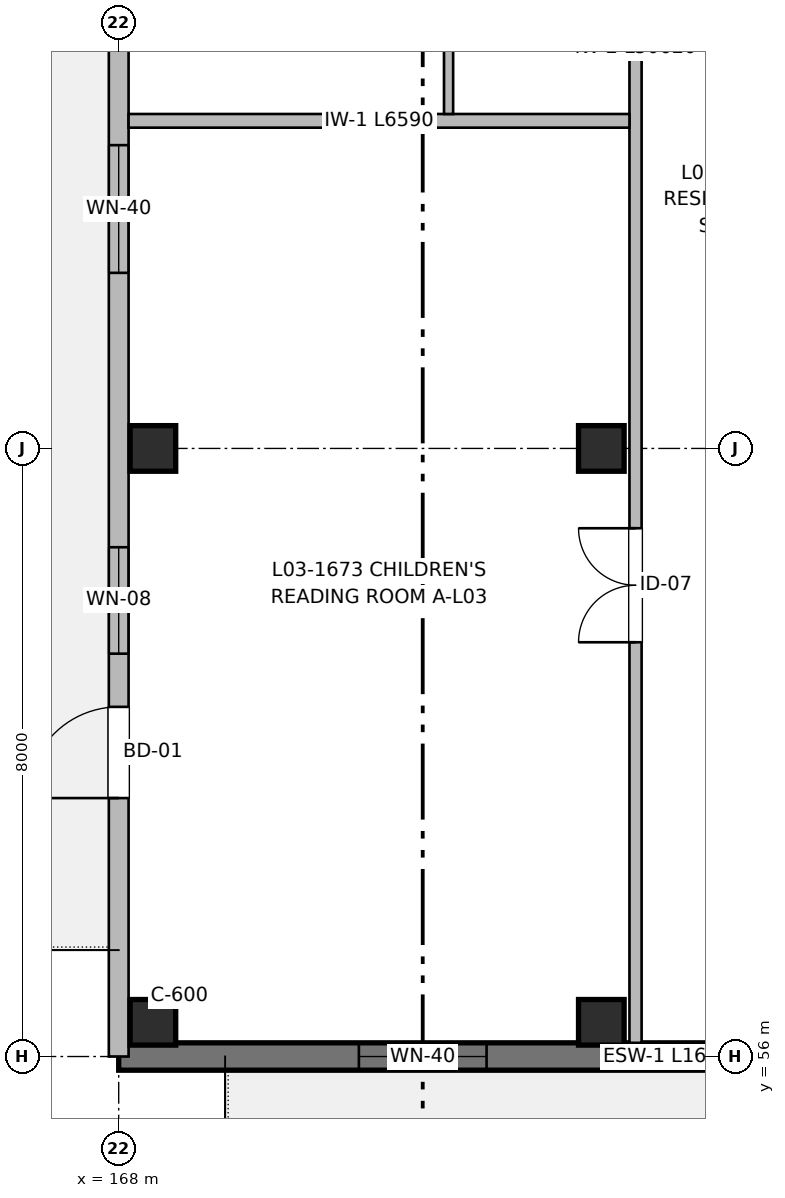
"""IFC4 building model, lengths in metres.
Left out: names, types, materials, properties, quantities, classifications, styles, units other than length and angle.
Written with IfcOpenShell. Run it as: python <this file> out.ifc"""

import sys

from ifc_helpers import new_model, si_unit, direction, frame, frame_2d, origin, origin_2d, place, context, subcontext, project, spatial, rectangle, extrude, element, fill, save


model = new_model("IFC4")
c1 = context("Model", 3, precision=1e-05, world=origin(), true_north=direction((0.0, 1.0)))
c2 = subcontext(c1, "Body", "Model", "MODEL_VIEW")
j1 = project(units=[si_unit("LENGTHUNIT", "METRE"), si_unit("PLANEANGLEUNIT", "RADIAN")], contexts=[c1])
p1 = place(None, origin())
s1 = spatial("IfcSite", under=j1, at=p1, CompositionType="ELEMENT")
p2 = place(p1, origin())
s2 = spatial("IfcBuilding", under=s1, at=p2, CompositionType="ELEMENT")
p3 = place(p2, frame((0.0, 0.0, 10.56)))
s3 = spatial("IfcBuildingStorey", under=s2, at=p3, CompositionType="ELEMENT", Elevation=10.56)
for number, where, z_axis, x_axis in (
    (1, (168.45, 56.45, 0.0), (0.0, 0.0, 1.0), (1.0, 0.0, 0.0)),
    (2, (168.45, 64.0, 0.0), (0.0, 0.0, 1.0), (1.0, 0.0, 0.0)),
    (3, (174.35, 56.45, 0.0), (0.0, 0.0, 1.0), (1.0, 0.0, 0.0)),
    (4, (174.35, 64.0, 0.0), (0.0, 0.0, 1.0), (1.0, 0.0, 0.0)),
):
    element("IfcColumn", number, at=place(p3, frame(where, z_axis=z_axis, x_axis=x_axis)), inside=s3, PredefinedType="COLUMN", context=c2, shape_type="SweptSolid", body=[
        extrude(rectangle(XDim=0.6, YDim=0.6, at=origin_2d()), origin(), (0.0, 0.0, 1.0), 3.2),
    ])
p4 = place(p3, frame((184.0, 56.0, 0.0), z_axis=(0.0, 0.0, 1.0), x_axis=(-1.0, 0.0, 0.0)))
e5 = element("IfcWall", 5, at=p4, inside=s3, PredefinedType="SHEAR", context=c2, shape_type="SweptSolid", body=[
    extrude(rectangle(XDim=16.0, YDim=0.36, at=frame_2d((8.0, 0.0))), origin(), (0.0, 0.0, 1.0), 2.98),
])
p5 = place(p4, frame((3.4, 0.0, 0.0)))
e6 = element("IfcOpeningElement", 6, at=p5, cuts=e5, PredefinedType="OPENING", context=c2, shape_type="SweptSolid", body=[
    extrude(rectangle(XDim=1.2, YDim=2.2, at=frame_2d((0.6, 1.1))), frame((0.0, 0.19, 0.0), z_axis=(0.0, -1.0, 0.0), x_axis=(1.0, 0.0, 0.0)), (0.0, 0.0, 1.0), 0.38),
])
p6 = place(p4, frame((4.85, 0.0, 0.87)))
e7 = element("IfcOpeningElement", 7, at=p6, cuts=e5, PredefinedType="OPENING", context=c2, shape_type="SweptSolid", body=[
    extrude(rectangle(XDim=1.4, YDim=1.35, at=frame_2d((0.7, 0.675))), frame((0.0, 0.19, 0.0), z_axis=(0.0, -1.0, 0.0), x_axis=(1.0, 0.0, 0.0)), (0.0, 0.0, 1.0), 0.38),
])
p7 = place(p4, frame((11.16, 0.0, 0.72)))
e8 = element("IfcOpeningElement", 8, at=p7, cuts=e5, PredefinedType="OPENING", context=c2, shape_type="SweptSolid", body=[
    extrude(rectangle(XDim=1.68, YDim=1.5, at=frame_2d((0.84, 0.75))), frame((0.0, 0.19, 0.0), z_axis=(0.0, -1.0, 0.0), x_axis=(1.0, 0.0, 0.0)), (0.0, 0.0, 1.0), 0.38),
])
p8 = place(p3, frame((168.0, 56.0, 0.0), z_axis=(0.0, 0.0, 1.0), x_axis=(0.0, 1.0, 0.0)))
e9 = element("IfcWall", 9, at=p8, inside=s3, PredefinedType="SOLIDWALL", context=c2, shape_type="SweptSolid", body=[
    extrude(rectangle(XDim=32.0, YDim=0.26, at=frame_2d((16.0, 0.0))), origin(), (0.0, 0.0, 1.0), 2.98),
])
p9 = place(p8, frame((3.4, 0.0, 0.0)))
e10 = element("IfcOpeningElement", 10, at=p9, cuts=e9, PredefinedType="OPENING", context=c2, shape_type="SweptSolid", body=[
    extrude(rectangle(XDim=1.2, YDim=2.2, at=frame_2d((0.6, 1.1))), frame((0.0, 0.14, 0.0), z_axis=(0.0, -1.0, 0.0), x_axis=(1.0, 0.0, 0.0)), (0.0, 0.0, 1.0), 0.28),
])
p10 = place(p8, frame((5.3, 0.0, 0.87)))
e11 = element("IfcOpeningElement", 11, at=p10, cuts=e9, PredefinedType="OPENING", context=c2, shape_type="SweptSolid", body=[
    extrude(rectangle(XDim=1.4, YDim=1.35, at=frame_2d((0.7, 0.675))), frame((0.0, 0.14, 0.0), z_axis=(0.0, -1.0, 0.0), x_axis=(1.0, 0.0, 0.0)), (0.0, 0.0, 1.0), 0.28),
])
p11 = place(p8, frame((10.31, 0.0, 0.72)))
e12 = element("IfcOpeningElement", 12, at=p11, cuts=e9, PredefinedType="OPENING", context=c2, shape_type="SweptSolid", body=[
    extrude(rectangle(XDim=1.68, YDim=1.5, at=frame_2d((0.84, 0.75))), frame((0.0, 0.14, 0.0), z_axis=(0.0, -1.0, 0.0), x_axis=(1.0, 0.0, 0.0)), (0.0, 0.0, 1.0), 0.28),
])
p12 = place(p8, frame((19.1, 0.0, 0.72)))
e13 = element("IfcOpeningElement", 13, at=p12, cuts=e9, PredefinedType="OPENING", context=c2, shape_type="SweptSolid", body=[
    extrude(rectangle(XDim=1.8, YDim=1.5, at=frame_2d((0.9, 0.75))), frame((0.0, 0.14, 0.0), z_axis=(0.0, -1.0, 0.0), x_axis=(1.0, 0.0, 0.0)), (0.0, 0.0, 1.0), 0.28),
])
p13 = place(p8, frame((27.0, 0.0, 0.72)))
e14 = element("IfcOpeningElement", 14, at=p13, cuts=e9, PredefinedType="OPENING", context=c2, shape_type="SweptSolid", body=[
    extrude(rectangle(XDim=2.0, YDim=1.5, at=frame_2d((1.0, 0.75))), frame((0.0, 0.14, 0.0), z_axis=(0.0, -1.0, 0.0), x_axis=(1.0, 0.0, 0.0)), (0.0, 0.0, 1.0), 0.28),
])
p14 = place(p8, frame((13.79, 0.0, 0.82)))
e15 = element("IfcOpeningElement", 15, at=p14, cuts=e9, PredefinedType="OPENING", context=c2, shape_type="SweptSolid", body=[
    extrude(rectangle(XDim=1.5, YDim=1.4, at=frame_2d((0.75, 0.7))), frame((0.0, 0.14, 0.0), z_axis=(0.0, -1.0, 0.0), x_axis=(1.0, 0.0, 0.0)), (0.0, 0.0, 1.0), 0.28),
])
p15 = place(p8, frame((24.43, 0.0, 0.82)))
e16 = element("IfcOpeningElement", 16, at=p15, cuts=e9, PredefinedType="OPENING", context=c2, shape_type="SweptSolid", body=[
    extrude(rectangle(XDim=1.5, YDim=1.4, at=frame_2d((0.75, 0.7))), frame((0.0, 0.14, 0.0), z_axis=(0.0, -1.0, 0.0), x_axis=(1.0, 0.0, 0.0)), (0.0, 0.0, 1.0), 0.28),
])
p16 = place(p8, frame((30.895, 0.0, 0.9)))
e17 = element("IfcOpeningElement", 17, at=p16, cuts=e9, PredefinedType="OPENING", context=c2, shape_type="SweptSolid", body=[
    extrude(rectangle(XDim=0.65, YDim=0.95, at=frame_2d((0.325, 0.475))), frame((0.0, 0.14, 0.0), z_axis=(0.0, -1.0, 0.0), x_axis=(1.0, 0.0, 0.0)), (0.0, 0.0, 1.0), 0.28),
])
p17 = place(p3, frame((174.8, 56.18, 0.0), z_axis=(0.0, 0.0, 1.0), x_axis=(0.0, 1.0, 0.0)))
e18 = element("IfcWall", 18, at=p17, inside=s3, PredefinedType="PARTITIONING", context=c2, shape_type="SweptSolid", body=[
    extrude(rectangle(XDim=50.62, YDim=0.16, at=frame_2d((25.31, 0.0))), origin(), (0.0, 0.0, 1.0), 2.935),
])
p18 = place(p17, frame((5.27, 0.0, 0.0)))
e19 = element("IfcOpeningElement", 19, at=p18, cuts=e18, PredefinedType="OPENING", context=c2, shape_type="SweptSolid", body=[
    extrude(rectangle(XDim=1.5, YDim=2.2, at=frame_2d((0.75, 1.1))), frame((0.0, 0.09, 0.0), z_axis=(0.0, -1.0, 0.0), x_axis=(1.0, 0.0, 0.0)), (0.0, 0.0, 1.0), 0.18),
])
p19 = place(p17, frame((19.4, 0.0, 0.0)))
e20 = element("IfcOpeningElement", 20, at=p19, cuts=e18, PredefinedType="OPENING", context=c2, shape_type="SweptSolid", body=[
    extrude(rectangle(XDim=1.02, YDim=2.15, at=frame_2d((0.51, 1.075))), frame((0.0, 0.09, 0.0), z_axis=(0.0, -1.0, 0.0), x_axis=(1.0, 0.0, 0.0)), (0.0, 0.0, 1.0), 0.18),
])
p20 = place(p17, frame((33.08, 0.0, 0.0)))
e21 = element("IfcOpeningElement", 21, at=p20, cuts=e18, PredefinedType="OPENING", context=c2, shape_type="SweptSolid", body=[
    extrude(rectangle(XDim=0.98, YDim=2.15, at=frame_2d((0.49, 1.075))), frame((0.0, 0.09, 0.0), z_axis=(0.0, -1.0, 0.0), x_axis=(1.0, 0.0, 0.0)), (0.0, 0.0, 1.0), 0.18),
])
p21 = place(p17, frame((45.33, 0.0, 0.0)))
e22 = element("IfcOpeningElement", 22, at=p21, cuts=e18, PredefinedType="OPENING", context=c2, shape_type="SweptSolid", body=[
    extrude(rectangle(XDim=0.98, YDim=2.15, at=frame_2d((0.49, 1.075))), frame((0.0, 0.09, 0.0), z_axis=(0.0, -1.0, 0.0), x_axis=(1.0, 0.0, 0.0)), (0.0, 0.0, 1.0), 0.18),
])
p22 = place(p3, frame((168.13, 68.31, 0.0), z_axis=(0.0, 0.0, 1.0), x_axis=(1.0, 0.0, 0.0)))
e23 = element("IfcWall", 23, at=p22, inside=s3, PredefinedType="PARTITIONING", context=c2, shape_type="SweptSolid", body=[
    extrude(rectangle(XDim=6.59, YDim=0.18, at=frame_2d((3.295, 0.0))), origin(), (0.0, 0.0, 1.0), 2.935),
])
p23 = place(p3, frame((172.34, 68.4, 0.0), z_axis=(0.0, 0.0, 1.0), x_axis=(0.0, 1.0, 0.0)))
e24 = element("IfcWall", 24, at=p23, inside=s3, PredefinedType="PARTITIONING", context=c2, shape_type="SweptSolid", body=[
    extrude(rectangle(XDim=13.97, YDim=0.12, at=frame_2d((6.985, 0.0))), origin(), (0.0, 0.0, 1.0), 2.935),
])
p24 = place(p23, frame((2.443, 0.0, 0.0)))
e25 = element("IfcOpeningElement", 25, at=p24, cuts=e24, PredefinedType="OPENING", context=c2, shape_type="SweptSolid", body=[
    extrude(rectangle(XDim=0.94, YDim=2.1, at=frame_2d((0.47, 1.05))), frame((0.0, 0.07, 0.0), z_axis=(0.0, -1.0, 0.0), x_axis=(1.0, 0.0, 0.0)), (0.0, 0.0, 1.0), 0.14),
])
p25 = place(p23, frame((8.541, 0.0, 0.0)))
e26 = element("IfcOpeningElement", 26, at=p25, cuts=e24, PredefinedType="OPENING", context=c2, shape_type="SweptSolid", body=[
    extrude(rectangle(XDim=0.92, YDim=2.1, at=frame_2d((0.46, 1.05))), frame((0.0, 0.07, 0.0), z_axis=(0.0, -1.0, 0.0), x_axis=(1.0, 0.0, 0.0)), (0.0, 0.0, 1.0), 0.14),
])
p26 = place(p7, origin())
e27 = element("IfcWindow", 27, at=p26, inside=s3, PartitioningType="SINGLE_PANEL", PredefinedType="WINDOW", context=c2, shape_type="SweptSolid", body=[
    extrude(rectangle(XDim=1.68, YDim=1.5, at=frame_2d((0.84, 0.75))), frame((0.0, 0.03, 0.0), z_axis=(0.0, -1.0, 0.0), x_axis=(1.0, 0.0, 0.0)), (0.0, 0.0, 1.0), 0.06),
])
fill(e8, e27)
p27 = place(p9, origin())
e28 = element("IfcDoor", 28, at=p27, inside=s3, OperationType="SINGLE_SWING_LEFT", PredefinedType="DOOR", context=c2, shape_type="SweptSolid", body=[
    extrude(rectangle(XDim=1.2, YDim=2.2, at=frame_2d((0.6, 1.1))), frame((0.0, 0.025, 0.0), z_axis=(0.0, -1.0, 0.0), x_axis=(1.0, 0.0, 0.0)), (0.0, 0.0, 1.0), 0.05),
])
fill(e10, e28)
p28 = place(p10, origin())
e29 = element("IfcWindow", 29, at=p28, inside=s3, PartitioningType="SINGLE_PANEL", PredefinedType="WINDOW", context=c2, shape_type="SweptSolid", body=[
    extrude(rectangle(XDim=1.4, YDim=1.35, at=frame_2d((0.7, 0.675))), frame((0.0, 0.03, 0.0), z_axis=(0.0, -1.0, 0.0), x_axis=(1.0, 0.0, 0.0)), (0.0, 0.0, 1.0), 0.06),
])
fill(e11, e29)
p29 = place(p11, origin())
e30 = element("IfcWindow", 30, at=p29, inside=s3, PartitioningType="SINGLE_PANEL", PredefinedType="WINDOW", context=c2, shape_type="SweptSolid", body=[
    extrude(rectangle(XDim=1.68, YDim=1.5, at=frame_2d((0.84, 0.75))), frame((0.0, 0.03, 0.0), z_axis=(0.0, -1.0, 0.0), x_axis=(1.0, 0.0, 0.0)), (0.0, 0.0, 1.0), 0.06),
])
fill(e12, e30)
p30 = place(p18, origin())
e31 = element("IfcDoor", 31, at=p30, inside=s3, OperationType="DOUBLE_DOOR_SINGLE_SWING", PredefinedType="DOOR", context=c2, shape_type="SweptSolid", body=[
    extrude(rectangle(XDim=1.5, YDim=2.2, at=frame_2d((0.75, 1.1))), frame((0.0, 0.025, 0.0), z_axis=(0.0, -1.0, 0.0), x_axis=(1.0, 0.0, 0.0)), (0.0, 0.0, 1.0), 0.05),
])
fill(e19, e31)
save(model, sys.argv[1])
